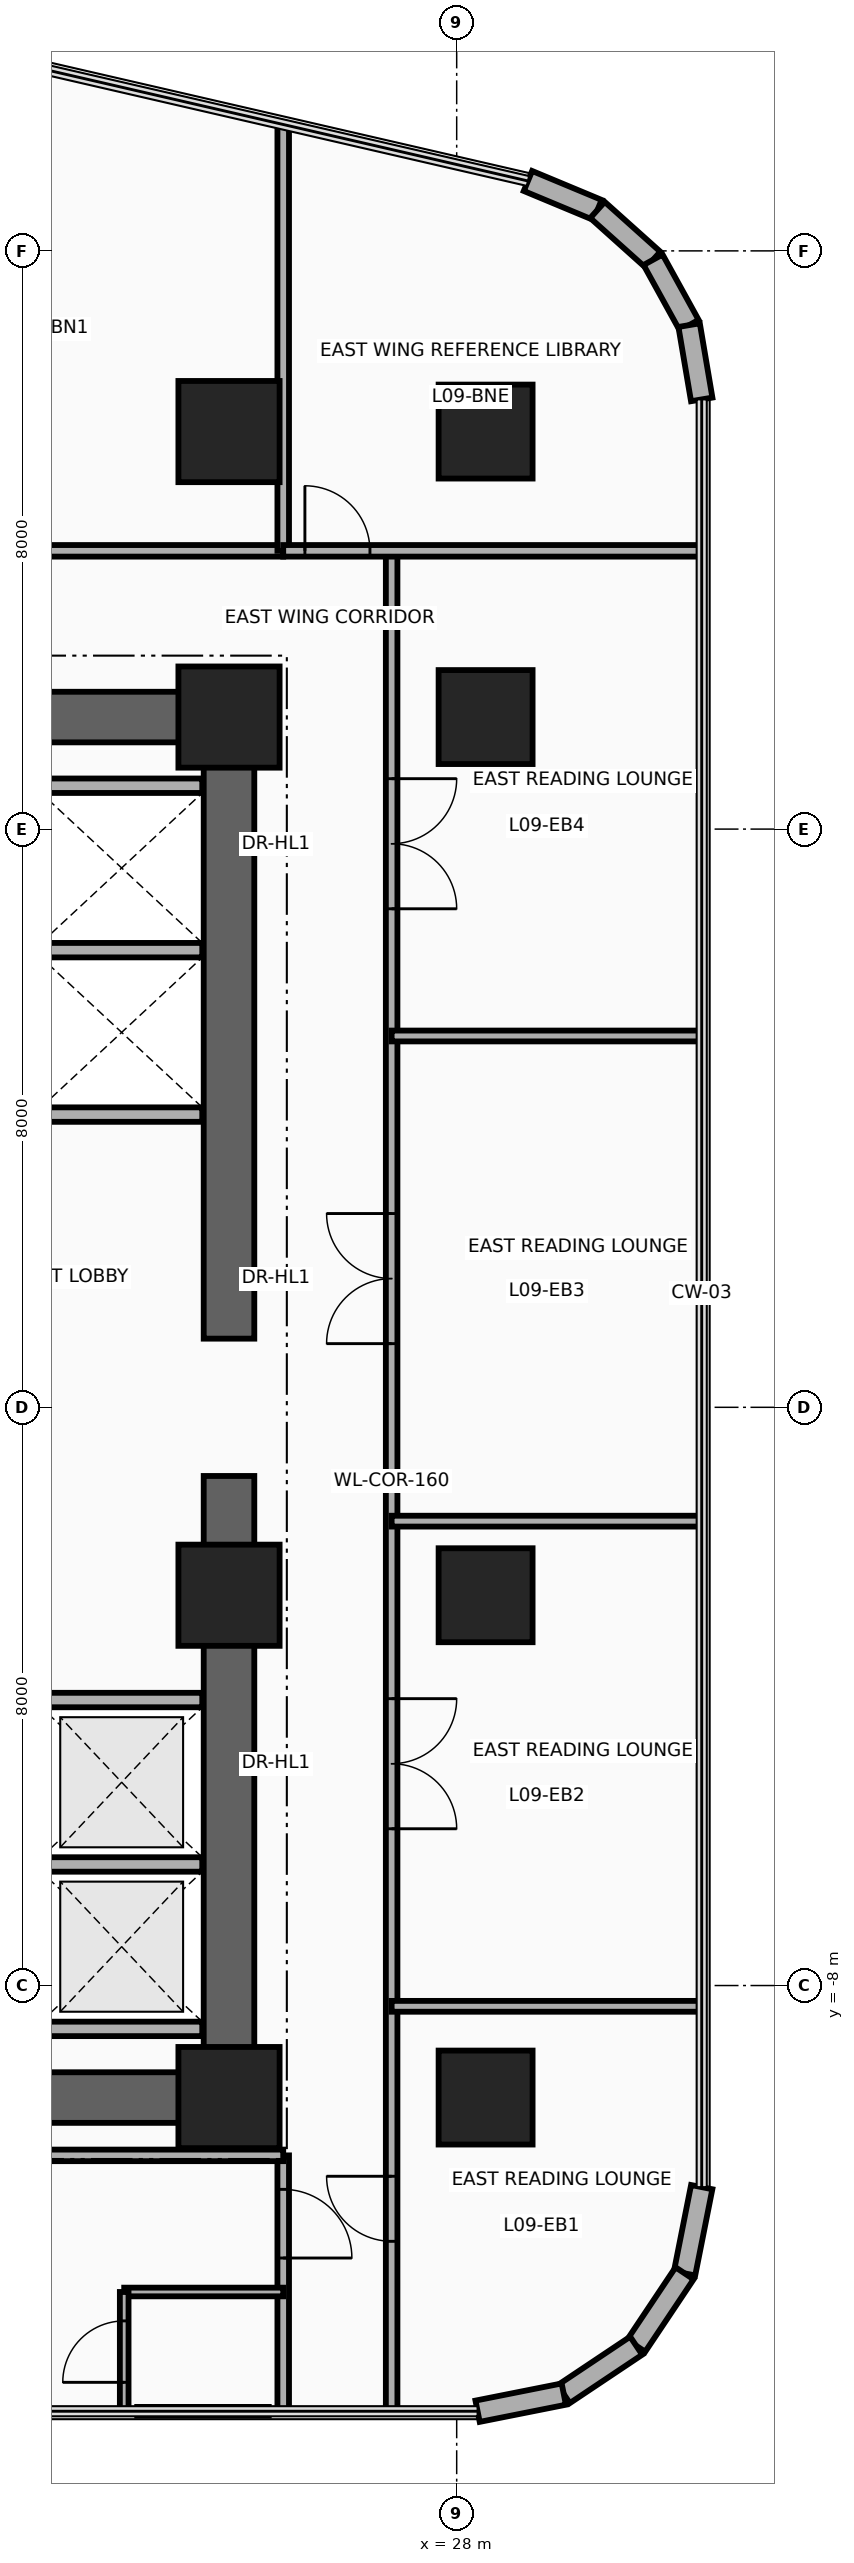
"""IFC4 building model, lengths in metres.
Left out: names, types, materials, properties, quantities, classifications, styles, units other than length and angle.
Written with IfcOpenShell. Run it as: python <this file> out.ifc"""

import sys

from ifc_helpers import new_model, si_unit, direction, frame, frame_2d, origin, origin_2d, place, context, subcontext, project, spatial, rectangle, circle, extrude, source, transform, mapped, element, fill, save


model = new_model("IFC4")
c1 = context("Model", 3, precision=1e-05, world=origin(), true_north=direction((0.0, 1.0)))
c2 = subcontext(c1, "Body", "Model", "MODEL_VIEW")
j1 = project(units=[si_unit("LENGTHUNIT", "METRE"), si_unit("PLANEANGLEUNIT", "RADIAN")], contexts=[c1])
p1 = place(None, origin())
s1 = spatial("IfcSite", under=j1, at=p1, CompositionType="ELEMENT")
p2 = place(p1, origin())
s2 = spatial("IfcBuilding", under=s1, at=p2, CompositionType="ELEMENT")
p3 = place(p2, frame((0.0, 0.0, 40.8)))
s3 = spatial("IfcBuildingStorey", under=s2, at=p3, CompositionType="ELEMENT", Elevation=40.8)
for number, where, z_axis, x_axis in (
    (1, (24.85, -9.9, 0.0), (0.0, 0.0, 1.0), (0.0, 1.0, 0.0)),
    (2, (24.85, 0.95, 0.0), (0.0, 0.0, 1.0), (0.0, 1.0, 0.0)),
):
    element("IfcWall", number, at=place(p3, frame(where, z_axis=z_axis, x_axis=x_axis)), inside=s3, PredefinedType="SHEAR", context=c2, shape_type="SweptSolid", body=[
        extrude(rectangle(XDim=8.95, YDim=0.7, at=frame_2d((4.475, 0.0))), origin(), (0.0, 0.0, 1.0), 3.46),
    ])
for number, where, z_axis, x_axis in (
    (3, (15.85, 9.55, 0.0), (0.0, 0.0, 1.0), (1.0, 0.0, 0.0)),
    (4, (15.85, -9.55, 0.0), (0.0, 0.0, 1.0), (1.0, 0.0, 0.0)),
):
    element("IfcWall", number, at=place(p3, frame(where, z_axis=z_axis, x_axis=x_axis)), inside=s3, PredefinedType="SHEAR", context=c2, shape_type="SweptSolid", body=[
        extrude(rectangle(XDim=9.0, YDim=0.7, at=frame_2d((4.5, 0.0))), origin(), (0.0, 0.0, 1.0), 3.46),
    ])
m1 = source(origin(), c2, "Body", "SweptSolid", [
    extrude(rectangle(XDim=1.4, YDim=1.4, at=origin_2d()), origin(), (0.0, 0.0, 1.0), 3.7),
])
p4 = place(p3, frame((24.85, -9.55, 0.0), z_axis=(0.0, 0.0, 1.0), x_axis=(1.0, 0.0, 0.0)))
e5 = element("IfcColumn", 5, at=p4, inside=s3, PredefinedType="COLUMN", context=c2, shape_type="MappedRepresentation", body=[
    mapped(m1, transform((0.0, 0.0, 0.0), x_axis=(1.0, 0.0, 0.0), y_axis=(0.0, 1.0, 0.0), z_axis=(0.0, 0.0, 1.0), scale=1.0)),
])
m2 = source(origin(), c2, "Body", "SweptSolid", [
    extrude(circle(Radius=0.65, at=origin_2d()), origin(), (0.0, 0.0, 1.0), 3.7),
])
p5 = place(p3, frame((28.4, -9.55, 0.0), z_axis=(0.0, 0.0, 1.0), x_axis=(1.0, 0.0, 0.0)))
e6 = element("IfcColumn", 6, at=p5, inside=s3, PredefinedType="COLUMN", context=c2, shape_type="MappedRepresentation", body=[
    mapped(m2, transform((0.0, 0.0, 0.0), x_axis=(1.0, 0.0, 0.0), y_axis=(0.0, 1.0, 0.0), z_axis=(0.0, 0.0, 1.0), scale=1.0)),
])
p6 = place(p3, frame((24.85, -2.6, 0.0), z_axis=(0.0, 0.0, 1.0), x_axis=(1.0, 0.0, 0.0)))
e7 = element("IfcColumn", 7, at=p6, inside=s3, PredefinedType="COLUMN", context=c2, shape_type="MappedRepresentation", body=[
    mapped(m1, transform((0.0, 0.0, 0.0), x_axis=(1.0, 0.0, 0.0), y_axis=(0.0, 1.0, 0.0), z_axis=(0.0, 0.0, 1.0), scale=1.0)),
])
p7 = place(p3, frame((28.4, -2.6, 0.0), z_axis=(0.0, 0.0, 1.0), x_axis=(1.0, 0.0, 0.0)))
e8 = element("IfcColumn", 8, at=p7, inside=s3, PredefinedType="COLUMN", context=c2, shape_type="MappedRepresentation", body=[
    mapped(m2, transform((0.0, 0.0, 0.0), x_axis=(1.0, 0.0, 0.0), y_axis=(0.0, 1.0, 0.0), z_axis=(0.0, 0.0, 1.0), scale=1.0)),
])
p8 = place(p3, frame((24.85, 9.55, 0.0), z_axis=(0.0, 0.0, 1.0), x_axis=(1.0, 0.0, 0.0)))
e9 = element("IfcColumn", 9, at=p8, inside=s3, PredefinedType="COLUMN", context=c2, shape_type="MappedRepresentation", body=[
    mapped(m1, transform((0.0, 0.0, 0.0), x_axis=(1.0, 0.0, 0.0), y_axis=(0.0, 1.0, 0.0), z_axis=(0.0, 0.0, 1.0), scale=1.0)),
])
p9 = place(p3, frame((28.4, 9.55, 0.0), z_axis=(0.0, 0.0, 1.0), x_axis=(1.0, 0.0, 0.0)))
e10 = element("IfcColumn", 10, at=p9, inside=s3, PredefinedType="COLUMN", context=c2, shape_type="MappedRepresentation", body=[
    mapped(m2, transform((0.0, 0.0, 0.0), x_axis=(1.0, 0.0, 0.0), y_axis=(0.0, 1.0, 0.0), z_axis=(0.0, 0.0, 1.0), scale=1.0)),
])
p10 = place(p3, frame((24.85, 13.5, 0.0), z_axis=(0.0, 0.0, 1.0), x_axis=(1.0, 0.0, 0.0)))
e11 = element("IfcColumn", 11, at=p10, inside=s3, PredefinedType="COLUMN", context=c2, shape_type="MappedRepresentation", body=[
    mapped(m1, transform((0.0, 0.0, 0.0), x_axis=(1.0, 0.0, 0.0), y_axis=(0.0, 1.0, 0.0), z_axis=(0.0, 0.0, 1.0), scale=1.0)),
])
p11 = place(p3, frame((28.4, 13.5, 0.0), z_axis=(0.0, 0.0, 1.0), x_axis=(1.0, 0.0, 0.0)))
e12 = element("IfcColumn", 12, at=p11, inside=s3, PredefinedType="COLUMN", context=c2, shape_type="MappedRepresentation", body=[
    mapped(m2, transform((0.0, 0.0, 0.0), x_axis=(1.0, 0.0, 0.0), y_axis=(0.0, 1.0, 0.0), z_axis=(0.0, 0.0, 1.0), scale=1.0)),
])
p12 = place(p3, frame((28.986, 16.967, 0.0), z_axis=(0.0, 0.0, 1.0), x_axis=(0.923083852684, -0.384598753136, 0.0)))
e13 = element("IfcWall", 13, at=p12, inside=s3, PredefinedType="SOLIDWALL", context=c2, shape_type="SweptSolid", body=[
    extrude(rectangle(XDim=1.042, YDim=0.3, at=frame_2d((0.521, 0.0))), origin(), (0.0, 0.0, 1.0), 3.46),
])
p13 = place(p3, frame((29.948, 16.566, 0.0), z_axis=(0.0, 0.0, 1.0), x_axis=(0.744585645533, -0.66752694063, 0.0)))
e14 = element("IfcWall", 14, at=p13, inside=s3, PredefinedType="SOLIDWALL", context=c2, shape_type="SweptSolid", body=[
    extrude(rectangle(XDim=1.033, YDim=0.3, at=frame_2d((0.517, 0.0))), origin(), (0.0, 0.0, 1.0), 3.46),
])
p14 = place(p3, frame((30.717, 15.877, 0.0), z_axis=(0.0, 0.0, 1.0), x_axis=(0.482971098131, -0.875636293429, 0.0)))
e15 = element("IfcWall", 15, at=p14, inside=s3, PredefinedType="SOLIDWALL", context=c2, shape_type="SweptSolid", body=[
    extrude(rectangle(XDim=1.033, YDim=0.3, at=frame_2d((0.516, 0.0))), origin(), (0.0, 0.0, 1.0), 3.46),
])
p15 = place(p3, frame((31.216, 14.973, 0.0), z_axis=(0.0, 0.0, 1.0), x_axis=(0.167019462117, -0.985953598946, 0.0)))
e16 = element("IfcWall", 16, at=p15, inside=s3, PredefinedType="SOLIDWALL", context=c2, shape_type="SweptSolid", body=[
    extrude(rectangle(XDim=1.042, YDim=0.3, at=frame_2d((0.521, 0.0))), origin(), (0.0, 0.0, 1.0), 3.46),
])
p16 = place(p3, frame((31.39, -10.789, 0.0), z_axis=(0.0, 0.0, 1.0), x_axis=(-0.194996050505, -0.980804027463, 0.0)))
e17 = element("IfcWall", 17, at=p16, inside=s3, PredefinedType="SOLIDWALL", context=c2, shape_type="SweptSolid", body=[
    extrude(rectangle(XDim=1.216, YDim=0.3, at=frame_2d((0.608, 0.0))), origin(), (0.0, 0.0, 1.0), 3.46),
])
for number, where, z_axis, x_axis in (
    (18, (31.153, -11.982, 0.0), (0.0, 0.0, 1.0), (-0.556, -0.831, 0.0)),
    (19, (30.483, -12.983, 0.0), (0.0, 0.0, 1.0), (-0.831, -0.556, 0.0)),
):
    element("IfcWall", number, at=place(p3, frame(where, z_axis=z_axis, x_axis=x_axis)), inside=s3, PredefinedType="SOLIDWALL", context=c2, shape_type="SweptSolid", body=[
        extrude(rectangle(XDim=1.205, YDim=0.3, at=frame_2d((0.603, 0.0))), origin(), (0.0, 0.0, 1.0), 3.46),
    ])
p17 = place(p3, frame((29.482, -13.653, 0.0), z_axis=(0.0, 0.0, 1.0), x_axis=(-0.980804027463, -0.194996050505, 0.0)))
e20 = element("IfcWall", 20, at=p17, inside=s3, PredefinedType="SOLIDWALL", context=c2, shape_type="SweptSolid", body=[
    extrude(rectangle(XDim=1.216, YDim=0.3, at=frame_2d((0.608, 0.0))), origin(), (0.0, 0.0, 1.0), 3.46),
])
for number, where, z_axis, x_axis in (
    (21, (22.25, -8.6, 0.0), (0.0, 0.0, 1.0), (1.0, 0.0, 0.0)),
    (22, (22.25, -6.325, 0.0), (0.0, 0.0, 1.0), (1.0, 0.0, 0.0)),
    (23, (22.25, -4.05, 0.0), (0.0, 0.0, 1.0), (1.0, 0.0, 0.0)),
):
    element("IfcWall", number, at=place(p3, frame(where, z_axis=z_axis, x_axis=x_axis)), inside=s3, PredefinedType="MOVABLE", context=c2, shape_type="SweptSolid", body=[
        extrude(rectangle(XDim=2.23, YDim=0.2, at=frame_2d((1.115, 0.0))), origin(), (0.0, 0.0, 1.0), 3.46),
    ])
for number, where, z_axis, x_axis in (
    (24, (22.25, 4.05, 0.0), (0.0, 0.0, 1.0), (1.0, 0.0, 0.0)),
    (25, (22.25, 6.325, 0.0), (0.0, 0.0, 1.0), (1.0, 0.0, 0.0)),
    (26, (22.25, 8.6, 0.0), (0.0, 0.0, 1.0), (1.0, 0.0, 0.0)),
):
    element("IfcWall", number, at=place(p3, frame(where, z_axis=z_axis, x_axis=x_axis)), inside=s3, PredefinedType="MOVABLE", context=c2, shape_type="SweptSolid", body=[
        extrude(rectangle(XDim=2.23, YDim=0.2, at=frame_2d((1.115, 0.0))), origin(), (0.0, 0.0, 1.0), 2.245),
    ])
p18 = place(p3, frame((15.4, 11.85, 0.0), z_axis=(0.0, 0.0, 1.0), x_axis=(1.0, 0.0, 0.0)))
e27 = element("IfcWall", 27, at=p18, inside=s3, PredefinedType="PARTITIONING", context=c2, shape_type="SweptSolid", body=[
    extrude(rectangle(XDim=10.2, YDim=0.16, at=frame_2d((5.1, 0.0))), origin(), (0.0, 0.0, 1.0), 2.834),
])
p19 = place(p18, frame((4.65, 0.0, 0.0)))
e28 = element("IfcOpeningElement", 28, at=p19, cuts=e27, PredefinedType="OPENING", context=c2, shape_type="SweptSolid", body=[
    extrude(rectangle(XDim=0.9, YDim=2.1, at=frame_2d((0.45, 1.05))), frame((0.0, 0.095, 0.0), z_axis=(0.0, -1.0, 0.0), x_axis=(1.0, 0.0, 0.0)), (0.0, 0.0, 1.0), 0.19),
])
p20 = place(p3, frame((25.6, 11.85, 0.0), z_axis=(0.0, 0.0, 1.0), x_axis=(0.0, 1.0, 0.0)))
e29 = element("IfcWall", 29, at=p20, inside=s3, PredefinedType="PARTITIONING", context=c2, shape_type="SweptSolid", body=[
    extrude(rectangle(XDim=5.898, YDim=0.16, at=frame_2d((2.949, 0.0))), origin(), (0.0, 0.0, 1.0), 2.583),
])
p21 = place(p3, frame((25.6, -13.89, 0.0), z_axis=(0.0, 0.0, 1.0), x_axis=(0.0, 1.0, 0.0)))
e30 = element("IfcWall", 30, at=p21, inside=s3, PredefinedType="PARTITIONING", context=c2, shape_type="SweptSolid", body=[
    extrude(rectangle(XDim=3.54, YDim=0.16, at=frame_2d((1.77, 0.0))), origin(), (0.0, 0.0, 1.0), 3.46),
])
p22 = place(p21, frame((2.12, 0.0, 0.0)))
e31 = element("IfcOpeningElement", 31, at=p22, cuts=e30, PredefinedType="OPENING", context=c2, shape_type="SweptSolid", body=[
    extrude(rectangle(XDim=0.95, YDim=2.15, at=frame_2d((0.475, 1.075))), frame((0.0, 0.095, 0.0), z_axis=(0.0, -1.0, 0.0), x_axis=(1.0, 0.0, 0.0)), (0.0, 0.0, 1.0), 0.19),
])
p23 = place(p3, frame((13.41, -10.35, 0.0), z_axis=(0.0, 0.0, 1.0), x_axis=(1.0, 0.0, 0.0)))
e32 = element("IfcWall", 32, at=p23, inside=s3, PredefinedType="PARTITIONING", context=c2, shape_type="SweptSolid", body=[
    extrude(rectangle(XDim=12.19, YDim=0.16, at=frame_2d((6.095, 0.0))), origin(), (0.0, 0.0, 1.0), 3.46),
])
p24 = place(p3, frame((23.4, -12.24, 0.0), z_axis=(0.0, 0.0, 1.0), x_axis=(1.0, 0.0, 0.0)))
e33 = element("IfcWall", 33, at=p24, inside=s3, PredefinedType="PARTITIONING", context=c2, shape_type="SweptSolid", body=[
    extrude(rectangle(XDim=2.2, YDim=0.12, at=frame_2d((1.1, 0.0))), origin(), (0.0, 0.0, 1.0), 3.46),
])
p25 = place(p3, frame((23.4, -13.89, 0.0), z_axis=(0.0, 0.0, 1.0), x_axis=(0.0, 1.0, 0.0)))
e34 = element("IfcWall", 34, at=p25, inside=s3, PredefinedType="PARTITIONING", context=c2, shape_type="SweptSolid", body=[
    extrude(rectangle(XDim=1.65, YDim=0.12, at=frame_2d((0.825, 0.0))), origin(), (0.0, 0.0, 1.0), 3.46),
])
p26 = place(p25, frame((0.4, 0.0, 0.0)))
e35 = element("IfcOpeningElement", 35, at=p26, cuts=e34, PredefinedType="OPENING", context=c2, shape_type="SweptSolid", body=[
    extrude(rectangle(XDim=0.85, YDim=2.1, at=frame_2d((0.425, 1.05))), frame((0.0, 0.075, 0.0), z_axis=(0.0, -1.0, 0.0), x_axis=(1.0, 0.0, 0.0)), (0.0, 0.0, 1.0), 0.15),
])
p27 = place(p3, frame((23.58, -13.89, 0.0), z_axis=(0.0, 0.0, 1.0), x_axis=(1.0, 0.0, 0.0)))
e36 = element("IfcWall", 36, at=p27, inside=s3, PredefinedType="PARTITIONING", context=c2, shape_type="SweptSolid", body=[
    extrude(rectangle(XDim=1.82, YDim=0.12, at=frame_2d((0.91, 0.0))), origin(), (0.0, 0.0, 1.0), 3.46),
])
p28 = place(p3, frame((27.1, -13.89, 0.0), z_axis=(0.0, 0.0, 1.0), x_axis=(0.0, 1.0, 0.0)))
e37 = element("IfcWall", 37, at=p28, inside=s3, PredefinedType="PARTITIONING", context=c2, shape_type="SweptSolid", body=[
    extrude(rectangle(XDim=25.74, YDim=0.16, at=frame_2d((12.87, 0.0))), origin(), (0.0, 0.0, 1.0), 2.583),
])
p29 = place(p28, frame((2.351, 0.0, 0.0)))
e38 = element("IfcOpeningElement", 38, at=p29, cuts=e37, PredefinedType="OPENING", context=c2, shape_type="SweptSolid", body=[
    extrude(rectangle(XDim=0.9, YDim=2.1, at=frame_2d((0.45, 1.05))), frame((0.0, 0.095, 0.0), z_axis=(0.0, -1.0, 0.0), x_axis=(1.0, 0.0, 0.0)), (0.0, 0.0, 1.0), 0.19),
])
p30 = place(p28, frame((8.059, 0.0, 0.0)))
e39 = element("IfcOpeningElement", 39, at=p30, cuts=e37, PredefinedType="OPENING", context=c2, shape_type="SweptSolid", body=[
    extrude(rectangle(XDim=1.8, YDim=2.15, at=frame_2d((0.9, 1.075))), frame((0.0, 0.095, 0.0), z_axis=(0.0, -1.0, 0.0), x_axis=(1.0, 0.0, 0.0)), (0.0, 0.0, 1.0), 0.19),
])
p31 = place(p28, frame((14.771, 0.0, 0.0)))
e40 = element("IfcOpeningElement", 40, at=p31, cuts=e37, PredefinedType="OPENING", context=c2, shape_type="SweptSolid", body=[
    extrude(rectangle(XDim=1.8, YDim=2.15, at=frame_2d((0.9, 1.075))), frame((0.0, 0.095, 0.0), z_axis=(0.0, -1.0, 0.0), x_axis=(1.0, 0.0, 0.0)), (0.0, 0.0, 1.0), 0.19),
])
p32 = place(p28, frame((20.788, 0.0, 0.0)))
e41 = element("IfcOpeningElement", 41, at=p32, cuts=e37, PredefinedType="OPENING", context=c2, shape_type="SweptSolid", body=[
    extrude(rectangle(XDim=1.8, YDim=2.15, at=frame_2d((0.9, 1.075))), frame((0.0, 0.095, 0.0), z_axis=(0.0, -1.0, 0.0), x_axis=(1.0, 0.0, 0.0)), (0.0, 0.0, 1.0), 0.19),
])
p33 = place(p3, frame((25.6, 11.85, 0.0), z_axis=(0.0, 0.0, 1.0), x_axis=(1.0, 0.0, 0.0)))
e42 = element("IfcWall", 42, at=p33, inside=s3, PredefinedType="PARTITIONING", context=c2, shape_type="SweptSolid", body=[
    extrude(rectangle(XDim=5.79, YDim=0.16, at=frame_2d((2.895, 0.0))), origin(), (0.0, 0.0, 1.0), 2.896),
])
p34 = place(p33, frame((0.3, 0.0, 0.0)))
e43 = element("IfcOpeningElement", 43, at=p34, cuts=e42, PredefinedType="OPENING", context=c2, shape_type="SweptSolid", body=[
    extrude(rectangle(XDim=0.9, YDim=2.1, at=frame_2d((0.45, 1.05))), frame((0.0, 0.095, 0.0), z_axis=(0.0, -1.0, 0.0), x_axis=(1.0, 0.0, 0.0)), (0.0, 0.0, 1.0), 0.19),
])
for number, where, z_axis, x_axis in (
    (44, (27.1, -8.288, 0.0), (0.0, 0.0, 1.0), (1.0, 0.0, 0.0)),
    (45, (27.1, -1.575, 0.0), (0.0, 0.0, 1.0), (1.0, 0.0, 0.0)),
    (46, (27.1, 5.137, 0.0), (0.0, 0.0, 1.0), (1.0, 0.0, 0.0)),
):
    element("IfcWall", number, at=place(p3, frame(where, z_axis=z_axis, x_axis=x_axis)), inside=s3, PredefinedType="PARTITIONING", context=c2, shape_type="SweptSolid", body=[
        extrude(rectangle(XDim=4.29, YDim=0.15, at=frame_2d((2.145, 0.0))), origin(), (0.0, 0.0, 1.0), 2.896),
    ])
p35 = place(p22, frame((0.95, 0.0, 0.0), z_axis=(0.0, 0.0, 1.0), x_axis=(-1.0, 0.0, 0.0)))
e47 = element("IfcDoor", 47, at=p35, inside=s3, OperationType="SINGLE_SWING_LEFT", PredefinedType="DOOR", context=c2, shape_type="SweptSolid", body=[
    extrude(rectangle(XDim=0.95, YDim=2.15, at=frame_2d((0.475, 1.075))), frame((0.0, 0.025, 0.0), z_axis=(0.0, -1.0, 0.0), x_axis=(1.0, 0.0, 0.0)), (0.0, 0.0, 1.0), 0.05),
])
fill(e31, e47)
p36 = place(p26, origin())
e48 = element("IfcDoor", 48, at=p36, inside=s3, OperationType="SINGLE_SWING_RIGHT", PredefinedType="DOOR", context=c2, shape_type="SweptSolid", body=[
    extrude(rectangle(XDim=0.85, YDim=2.1, at=frame_2d((0.425, 1.05))), frame((0.0, 0.025, 0.0), z_axis=(0.0, -1.0, 0.0), x_axis=(1.0, 0.0, 0.0)), (0.0, 0.0, 1.0), 0.05),
])
fill(e35, e48)
p37 = place(p34, origin())
e49 = element("IfcDoor", 49, at=p37, inside=s3, OperationType="SINGLE_SWING_LEFT", PredefinedType="DOOR", context=c2, shape_type="SweptSolid", body=[
    extrude(rectangle(XDim=0.9, YDim=2.1, at=frame_2d((0.45, 1.05))), frame((0.0, 0.025, 0.0), z_axis=(0.0, -1.0, 0.0), x_axis=(1.0, 0.0, 0.0)), (0.0, 0.0, 1.0), 0.05),
])
fill(e43, e49)
p38 = place(p29, origin())
e50 = element("IfcDoor", 50, at=p38, inside=s3, OperationType="SINGLE_SWING_RIGHT", PredefinedType="DOOR", context=c2, shape_type="SweptSolid", body=[
    extrude(rectangle(XDim=0.9, YDim=2.1, at=frame_2d((0.45, 1.05))), frame((0.0, 0.025, 0.0), z_axis=(0.0, -1.0, 0.0), x_axis=(1.0, 0.0, 0.0)), (0.0, 0.0, 1.0), 0.05),
])
fill(e38, e50)
p39 = place(p30, frame((1.8, 0.0, 0.0), z_axis=(0.0, 0.0, 1.0), x_axis=(-1.0, 0.0, 0.0)))
e51 = element("IfcDoor", 51, at=p39, inside=s3, OperationType="DOUBLE_DOOR_SINGLE_SWING", PredefinedType="DOOR", context=c2, shape_type="SweptSolid", body=[
    extrude(rectangle(XDim=1.8, YDim=2.15, at=frame_2d((0.9, 1.075))), frame((0.0, 0.025, 0.0), z_axis=(0.0, -1.0, 0.0), x_axis=(1.0, 0.0, 0.0)), (0.0, 0.0, 1.0), 0.05),
])
fill(e39, e51)
p40 = place(p31, origin())
e52 = element("IfcDoor", 52, at=p40, inside=s3, OperationType="DOUBLE_DOOR_SINGLE_SWING", PredefinedType="DOOR", context=c2, shape_type="SweptSolid", body=[
    extrude(rectangle(XDim=1.8, YDim=2.15, at=frame_2d((0.9, 1.075))), frame((0.0, 0.025, 0.0), z_axis=(0.0, -1.0, 0.0), x_axis=(1.0, 0.0, 0.0)), (0.0, 0.0, 1.0), 0.05),
])
fill(e40, e52)
p41 = place(p32, frame((1.8, 0.0, 0.0), z_axis=(0.0, 0.0, 1.0), x_axis=(-1.0, 0.0, 0.0)))
e53 = element("IfcDoor", 53, at=p41, inside=s3, OperationType="DOUBLE_DOOR_SINGLE_SWING", PredefinedType="DOOR", context=c2, shape_type="SweptSolid", body=[
    extrude(rectangle(XDim=1.8, YDim=2.15, at=frame_2d((0.9, 1.075))), frame((0.0, 0.025, 0.0), z_axis=(0.0, -1.0, 0.0), x_axis=(1.0, 0.0, 0.0)), (0.0, 0.0, 1.0), 0.05),
])
fill(e41, e53)
save(model, sys.argv[1])
